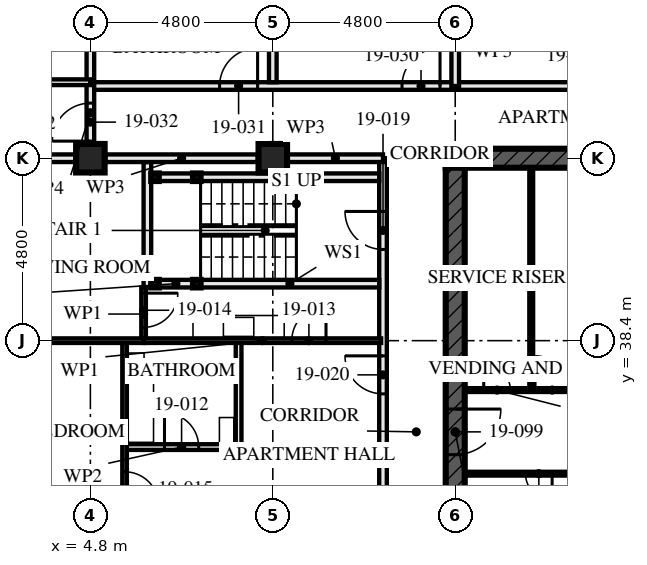
"""IFC4 building model, lengths in metres.
Left out: names, types, materials, properties, quantities, classifications, styles, units other than length and angle.
Written with IfcOpenShell. Run it as: python <this file> out.ifc"""

import sys

from ifc_helpers import new_model, si_unit, direction, frame, frame_2d, origin, origin_2d, place, context, subcontext, project, spatial, rectangle, hollow_rectangle, extrude, element, fill, save


model = new_model("IFC4")
c1 = context("Model", 3, precision=1e-05, world=origin(), true_north=direction((0.0, 1.0)))
c2 = subcontext(c1, "Body", "Model", "MODEL_VIEW")
j1 = project(units=[si_unit("LENGTHUNIT", "METRE"), si_unit("PLANEANGLEUNIT", "RADIAN")], contexts=[c1])
p1 = place(None, origin())
s1 = spatial("IfcSite", under=j1, at=p1, CompositionType="ELEMENT")
p2 = place(p1, origin())
s2 = spatial("IfcBuilding", under=s1, at=p2, CompositionType="ELEMENT")
p3 = place(p2, frame((0.0, 0.0, 72.5)))
s3 = spatial("IfcBuildingStorey", under=s2, at=p3, CompositionType="ELEMENT", Elevation=72.5)
for number, where, z_axis, x_axis in (
    (1, (4.8, 43.2, 0.0), (0.0, 0.0, 1.0), (0.0, 1.0, 0.0)),
    (2, (9.6, 43.2, 0.0), (0.0, 0.0, 1.0), (0.0, 1.0, 0.0)),
):
    element("IfcColumn", number, at=place(p3, frame(where, z_axis=z_axis, x_axis=x_axis)), inside=s3, PredefinedType="COLUMN", context=c2, shape_type="SweptSolid", body=[
        extrude(hollow_rectangle(XDim=0.75, YDim=0.75, WallThickness=0.08, at=origin_2d()), origin(), (0.0, 0.0, 1.0), 3.5),
    ])
p4 = place(p3, frame((29.05, 43.2, -0.17), z_axis=(0.0, 0.0, 1.0), x_axis=(-1.0, 0.0, 0.0)))
e3 = element("IfcWall", 3, at=p4, inside=s3, PredefinedType="SHEAR", context=c2, shape_type="SweptSolid", body=[
    extrude(rectangle(XDim=14.9, YDim=0.5, at=frame_2d((7.45, 0.0))), origin(), (0.0, 0.0, 1.0), 3.5),
])
p5 = place(p4, frame((6.85, 0.0, 0.17)))
e4 = element("IfcOpeningElement", 4, at=p5, cuts=e3, PredefinedType="OPENING", context=c2, shape_type="SweptSolid", body=[
    extrude(rectangle(XDim=1.2, YDim=2.1, at=frame_2d((0.6, 1.05))), frame((0.0, 0.26, 0.0), z_axis=(0.0, -1.0, 0.0), x_axis=(1.0, 0.0, 0.0)), (0.0, 0.0, 1.0), 0.521),
])
p6 = place(p3, frame((14.4, 42.95, -0.17), z_axis=(0.0, 0.0, 1.0), x_axis=(0.0, -1.0, 0.0)))
e5 = element("IfcWall", 5, at=p6, inside=s3, PredefinedType="SHEAR", context=c2, shape_type="SweptSolid", body=[
    extrude(rectangle(XDim=13.9, YDim=0.5, at=frame_2d((6.95, 0.0))), origin(), (0.0, 0.0, 1.0), 3.5),
])
p7 = place(p6, frame((6.35, 0.0, 0.17)))
e6 = element("IfcOpeningElement", 6, at=p7, cuts=e5, PredefinedType="OPENING", context=c2, shape_type="SweptSolid", body=[
    extrude(rectangle(XDim=1.2, YDim=2.1, at=frame_2d((0.6, 1.05))), frame((0.0, 0.26, 0.0), z_axis=(0.0, -1.0, 0.0), x_axis=(1.0, 0.0, 0.0)), (0.0, 0.0, 1.0), 0.521),
])
for number, where, z_axis, x_axis in (
    (7, (6.5, 42.7, 0.0), (0.0, 0.0, 1.0), (1.0, 0.0, 0.0)),
    (8, (6.5, 39.9, 0.0), (0.0, 0.0, 1.0), (1.0, 0.0, 0.0)),
    (9, (7.6, 42.7, 0.0), (0.0, 0.0, 1.0), (1.0, 0.0, 0.0)),
    (10, (7.6, 39.9, 0.0), (0.0, 0.0, 1.0), (1.0, 0.0, 0.0)),
):
    element("IfcColumn", number, at=place(p3, frame(where, z_axis=z_axis, x_axis=x_axis)), inside=s3, PredefinedType="COLUMN", context=c2, shape_type="SweptSolid", body=[
        extrude(hollow_rectangle(XDim=0.2, YDim=0.2, WallThickness=0.008, at=origin_2d()), origin(), (0.0, 0.0, 1.0), 3.33),
    ])
p8 = place(p3, frame((6.6, 42.7, 0.0), z_axis=(0.0, 0.0, 1.0), x_axis=(1.0, 0.0, 0.0)))
e11 = element("IfcWall", 11, at=p8, inside=s3, PredefinedType="SOLIDWALL", context=c2, shape_type="SweptSolid", body=[
    extrude(rectangle(XDim=0.9, YDim=0.2, at=frame_2d((0.45, 0.0))), origin(), (0.0, 0.0, 1.0), 2.99),
])
p9 = place(p3, frame((7.7, 42.7, 0.0), z_axis=(0.0, 0.0, 1.0), x_axis=(1.0, 0.0, 0.0)))
e12 = element("IfcWall", 12, at=p9, inside=s3, PredefinedType="SOLIDWALL", context=c2, shape_type="SweptSolid", body=[
    extrude(rectangle(XDim=4.7, YDim=0.2, at=frame_2d((2.35, 0.0))), origin(), (0.0, 0.0, 1.0), 2.99),
])
p10 = place(p3, frame((6.6, 39.9, 0.0), z_axis=(0.0, 0.0, 1.0), x_axis=(1.0, 0.0, 0.0)))
e13 = element("IfcWall", 13, at=p10, inside=s3, PredefinedType="SOLIDWALL", context=c2, shape_type="SweptSolid", body=[
    extrude(rectangle(XDim=0.9, YDim=0.2, at=frame_2d((0.45, 0.0))), origin(), (0.0, 0.0, 1.0), 2.99),
])
p11 = place(p3, frame((7.7, 39.9, 0.0), z_axis=(0.0, 0.0, 1.0), x_axis=(1.0, 0.0, 0.0)))
e14 = element("IfcWall", 14, at=p11, inside=s3, PredefinedType="SOLIDWALL", context=c2, shape_type="SweptSolid", body=[
    extrude(rectangle(XDim=4.7, YDim=0.2, at=frame_2d((2.35, 0.0))), origin(), (0.0, 0.0, 1.0), 2.99),
])
p12 = place(p3, frame((6.3, 43.1, 0.0), z_axis=(0.0, 0.0, 1.0), x_axis=(0.0, -1.0, 0.0)))
e15 = element("IfcWall", 15, at=p12, inside=s3, PredefinedType="SOLIDWALL", context=c2, shape_type="SweptSolid", body=[
    extrude(rectangle(XDim=3.3, YDim=0.2, at=frame_2d((1.65, 0.0))), origin(), (0.0, 0.0, 1.0), 3.33),
])
p13 = place(p3, frame((5.7, 35.6, 0.0), z_axis=(0.0, 0.0, 1.0), x_axis=(1.0, 0.0, 0.0)))
e16 = element("IfcWall", 16, at=p13, inside=s3, PredefinedType="PARTITIONING", context=c2, shape_type="SweptSolid", body=[
    extrude(rectangle(XDim=3.0, YDim=0.15, at=frame_2d((1.5, 0.0))), origin(), (0.0, 0.0, 1.0), 3.33),
])
p14 = place(p13, frame((1.05, 0.0, 0.0)))
e17 = element("IfcOpeningElement", 17, at=p14, cuts=e16, PredefinedType="OPENING", context=c2, shape_type="SweptSolid", body=[
    extrude(rectangle(XDim=0.9, YDim=2.1, at=frame_2d((0.45, 1.05))), frame((0.0, 0.085, 0.0), z_axis=(0.0, -1.0, 0.0), x_axis=(1.0, 0.0, 0.0)), (0.0, 0.0, 1.0), 0.171),
])
p15 = place(p3, frame((8.7, 38.4, 0.0), z_axis=(0.0, 0.0, 1.0), x_axis=(0.0, -1.0, 0.0)))
e18 = element("IfcWall", 18, at=p15, inside=s3, PredefinedType="PARTITIONING", context=c2, shape_type="SweptSolid", body=[
    extrude(rectangle(XDim=2.8, YDim=0.15, at=frame_2d((1.4, 0.0))), origin(), (0.0, 0.0, 1.0), 3.33),
])
p16 = place(p3, frame((6.2, 38.4, 0.0), z_axis=(0.0, 0.0, 1.0), x_axis=(1.0, 0.0, 0.0)))
e19 = element("IfcWall", 19, at=p16, inside=s3, PredefinedType="PARTITIONING", context=c2, shape_type="SweptSolid", body=[
    extrude(rectangle(XDim=6.25, YDim=0.12, at=frame_2d((3.125, 0.0))), origin(), (0.0, 0.0, 1.0), 2.55),
])
p17 = place(p16, frame((3.9, 0.0, 0.0)))
e20 = element("IfcOpeningElement", 20, at=p17, cuts=e19, PredefinedType="OPENING", context=c2, shape_type="SweptSolid", body=[
    extrude(rectangle(XDim=0.9, YDim=2.1, at=frame_2d((0.45, 1.05))), frame((0.0, 0.071, 0.0), z_axis=(0.0, -1.0, 0.0), x_axis=(1.0, 0.0, 0.0)), (0.0, 0.0, 1.0), 0.141),
])
p18 = place(p3, frame((6.2, 39.8, 0.0), z_axis=(0.0, 0.0, 1.0), x_axis=(0.0, -1.0, 0.0)))
e21 = element("IfcWall", 21, at=p18, inside=s3, PredefinedType="PARTITIONING", context=c2, shape_type="SweptSolid", body=[
    extrude(rectangle(XDim=1.4, YDim=0.12, at=frame_2d((0.7, 0.0))), origin(), (0.0, 0.0, 1.0), 3.33),
])
p19 = place(p18, frame((0.15, 0.0, 0.0)))
e22 = element("IfcOpeningElement", 22, at=p19, cuts=e21, PredefinedType="OPENING", context=c2, shape_type="SweptSolid", body=[
    extrude(rectangle(XDim=0.9, YDim=2.1, at=frame_2d((0.45, 1.05))), frame((0.0, 0.071, 0.0), z_axis=(0.0, -1.0, 0.0), x_axis=(1.0, 0.0, 0.0)), (0.0, 0.0, 1.0), 0.141),
])
p20 = place(p3, frame((5.7, 38.4, 0.0), z_axis=(0.0, 0.0, 1.0), x_axis=(0.0, -1.0, 0.0)))
e23 = element("IfcWall", 23, at=p20, inside=s3, PredefinedType="PARTITIONING", context=c2, shape_type="SweptSolid", body=[
    extrude(rectangle(XDim=4.8, YDim=0.12, at=frame_2d((2.4, 0.0))), origin(), (0.0, 0.0, 1.0), 3.33),
])
p21 = place(p20, frame((3.45, 0.0, 0.0)))
e24 = element("IfcOpeningElement", 24, at=p21, cuts=e23, PredefinedType="OPENING", context=c2, shape_type="SweptSolid", body=[
    extrude(rectangle(XDim=0.9, YDim=2.1, at=frame_2d((0.45, 1.05))), frame((0.0, 0.071, 0.0), z_axis=(0.0, -1.0, 0.0), x_axis=(1.0, 0.0, 0.0)), (0.0, 0.0, 1.0), 0.141),
])
p22 = place(p3, frame((0.32, 38.4, 0.0), z_axis=(0.0, 0.0, 1.0), x_axis=(1.0, 0.0, 0.0)))
e25 = element("IfcWall", 25, at=p22, inside=s3, PredefinedType="PARTITIONING", context=c2, shape_type="SweptSolid", body=[
    extrude(rectangle(XDim=5.88, YDim=0.12, at=frame_2d((2.94, 0.0))), origin(), (0.0, 0.0, 1.0), 2.55),
])
p23 = place(p3, frame((12.5, 43.2, 0.0), z_axis=(0.0, 0.0, 1.0), x_axis=(0.0, -1.0, 0.0)))
e26 = element("IfcWall", 26, at=p23, inside=s3, PredefinedType="PARTITIONING", context=c2, shape_type="SweptSolid", body=[
    extrude(rectangle(XDim=14.4, YDim=0.2, at=frame_2d((7.2, 0.0))), origin(), (0.0, 0.0, 1.0), 2.55),
])
p24 = place(p23, frame((1.4, 0.0, 0.0)))
e27 = element("IfcOpeningElement", 27, at=p24, cuts=e26, PredefinedType="OPENING", context=c2, shape_type="SweptSolid", body=[
    extrude(rectangle(XDim=1.0, YDim=2.1, at=frame_2d((0.5, 1.05))), frame((0.0, 0.111, 0.0), z_axis=(0.0, -1.0, 0.0), x_axis=(1.0, 0.0, 0.0)), (0.0, 0.0, 1.0), 0.221),
])
p25 = place(p23, frame((5.2, 0.0, 0.0)))
e28 = element("IfcOpeningElement", 28, at=p25, cuts=e26, PredefinedType="OPENING", context=c2, shape_type="SweptSolid", body=[
    extrude(rectangle(XDim=1.0, YDim=2.1, at=frame_2d((0.5, 1.05))), frame((0.0, 0.111, 0.0), z_axis=(0.0, -1.0, 0.0), x_axis=(1.0, 0.0, 0.0)), (0.0, 0.0, 1.0), 0.221),
])
p26 = place(p23, frame((10.0, 0.0, 0.0)))
e29 = element("IfcOpeningElement", 29, at=p26, cuts=e26, PredefinedType="OPENING", context=c2, shape_type="SweptSolid", body=[
    extrude(rectangle(XDim=1.0, YDim=2.1, at=frame_2d((0.5, 1.05))), frame((0.0, 0.111, 0.0), z_axis=(0.0, -1.0, 0.0), x_axis=(1.0, 0.0, 0.0)), (0.0, 0.0, 1.0), 0.221),
])
p27 = place(p3, frame((9.6, 57.28, 0.0), z_axis=(0.0, 0.0, 1.0), x_axis=(0.0, -1.0, 0.0)))
e30 = element("IfcWall", 30, at=p27, inside=s3, PredefinedType="PARTITIONING", context=c2, shape_type="SweptSolid", body=[
    extrude(rectangle(XDim=12.08, YDim=0.2, at=frame_2d((6.04, 0.0))), origin(), (0.0, 0.0, 1.0), 2.55),
])
p28 = place(p3, frame((4.8, 52.48, 0.0), z_axis=(0.0, 0.0, 1.0), x_axis=(0.0, -1.0, 0.0)))
e31 = element("IfcWall", 31, at=p28, inside=s3, PredefinedType="PARTITIONING", context=c2, shape_type="SweptSolid", body=[
    extrude(rectangle(XDim=7.28, YDim=0.2, at=frame_2d((3.64, 0.0))), origin(), (0.0, 0.0, 1.0), 2.55),
])
p29 = place(p3, frame((4.8, 45.2, 0.0), z_axis=(0.0, 0.0, 1.0), x_axis=(-1.0, 0.0, 0.0)))
e32 = element("IfcWall", 32, at=p29, inside=s3, PredefinedType="PARTITIONING", context=c2, shape_type="SweptSolid", body=[
    extrude(rectangle(XDim=2.8, YDim=0.15, at=frame_2d((1.4, 0.0))), origin(), (0.0, 0.0, 1.0), 3.33),
])
p30 = place(p3, frame((14.4, 45.1, 0.0), z_axis=(0.0, 0.0, 1.0), x_axis=(-1.0, 0.0, 0.0)))
e33 = element("IfcWall", 33, at=p30, inside=s3, PredefinedType="PARTITIONING", context=c2, shape_type="SweptSolid", body=[
    extrude(rectangle(XDim=9.6, YDim=0.2, at=frame_2d((4.8, 0.0))), origin(), (0.0, 0.0, 1.0), 3.33),
])
p31 = place(p30, frame((0.4, 0.0, 0.0)))
e34 = element("IfcOpeningElement", 34, at=p31, cuts=e33, PredefinedType="OPENING", context=c2, shape_type="SweptSolid", body=[
    extrude(rectangle(XDim=1.0, YDim=2.1, at=frame_2d((0.5, 1.05))), frame((0.0, 0.111, 0.0), z_axis=(0.0, -1.0, 0.0), x_axis=(1.0, 0.0, 0.0)), (0.0, 0.0, 1.0), 0.221),
])
p32 = place(p30, frame((5.2, 0.0, 0.0)))
e35 = element("IfcOpeningElement", 35, at=p32, cuts=e33, PredefinedType="OPENING", context=c2, shape_type="SweptSolid", body=[
    extrude(rectangle(XDim=1.0, YDim=2.1, at=frame_2d((0.5, 1.05))), frame((0.0, 0.111, 0.0), z_axis=(0.0, -1.0, 0.0), x_axis=(1.0, 0.0, 0.0)), (0.0, 0.0, 1.0), 0.221),
])
p33 = place(p3, frame((4.8, 45.2, 0.0), z_axis=(0.0, 0.0, 1.0), x_axis=(0.0, -1.0, 0.0)))
e36 = element("IfcWall", 36, at=p33, inside=s3, PredefinedType="PARTITIONING", context=c2, shape_type="SweptSolid", body=[
    extrude(rectangle(XDim=1.605, YDim=0.2, at=frame_2d((0.802, 0.0))), origin(), (0.0, 0.0, 1.0), 3.33),
])
p34 = place(p33, frame((0.55, 0.0, 0.0)))
e37 = element("IfcOpeningElement", 37, at=p34, cuts=e36, PredefinedType="OPENING", context=c2, shape_type="SweptSolid", body=[
    extrude(rectangle(XDim=1.0, YDim=2.1, at=frame_2d((0.5, 1.05))), frame((0.0, 0.111, 0.0), z_axis=(0.0, -1.0, 0.0), x_axis=(1.0, 0.0, 0.0)), (0.0, 0.0, 1.0), 0.221),
])
p35 = place(p3, frame((28.8, 45.1, 0.0), z_axis=(0.0, 0.0, 1.0), x_axis=(-1.0, 0.0, 0.0)))
e38 = element("IfcWall", 38, at=p35, inside=s3, PredefinedType="PARTITIONING", context=c2, shape_type="SweptSolid", body=[
    extrude(rectangle(XDim=14.4, YDim=0.2, at=frame_2d((7.2, 0.0))), origin(), (0.0, 0.0, 1.0), 3.33),
])
p36 = place(p35, frame((0.4, 0.0, 0.0)))
e39 = element("IfcOpeningElement", 39, at=p36, cuts=e38, PredefinedType="OPENING", context=c2, shape_type="SweptSolid", body=[
    extrude(rectangle(XDim=1.0, YDim=2.1, at=frame_2d((0.5, 1.05))), frame((0.0, 0.111, 0.0), z_axis=(0.0, -1.0, 0.0), x_axis=(1.0, 0.0, 0.0)), (0.0, 0.0, 1.0), 0.221),
])
p37 = place(p35, frame((5.2, 0.0, 0.0)))
e40 = element("IfcOpeningElement", 40, at=p37, cuts=e38, PredefinedType="OPENING", context=c2, shape_type="SweptSolid", body=[
    extrude(rectangle(XDim=1.0, YDim=2.1, at=frame_2d((0.5, 1.05))), frame((0.0, 0.111, 0.0), z_axis=(0.0, -1.0, 0.0), x_axis=(1.0, 0.0, 0.0)), (0.0, 0.0, 1.0), 0.221),
])
p38 = place(p35, frame((10.0, 0.0, 0.0)))
e41 = element("IfcOpeningElement", 41, at=p38, cuts=e38, PredefinedType="OPENING", context=c2, shape_type="SweptSolid", body=[
    extrude(rectangle(XDim=1.0, YDim=2.1, at=frame_2d((0.5, 1.05))), frame((0.0, 0.111, 0.0), z_axis=(0.0, -1.0, 0.0), x_axis=(1.0, 0.0, 0.0)), (0.0, 0.0, 1.0), 0.221),
])
p39 = place(p3, frame((16.4, 37.15, 0.0), z_axis=(0.0, 0.0, 1.0), x_axis=(0.0, 1.0, 0.0)))
e42 = element("IfcWall", 42, at=p39, inside=s3, PredefinedType="SOLIDWALL", context=c2, shape_type="SweptSolid", body=[
    extrude(rectangle(XDim=5.8, YDim=0.1, at=frame_2d((2.9, 0.0))), origin(), (0.0, 0.0, 1.0), 3.33),
])
p40 = place(p3, frame((14.65, 34.9, 0.0), z_axis=(0.0, 0.0, 1.0), x_axis=(1.0, 0.0, 0.0)))
e43 = element("IfcWall", 43, at=p40, inside=s3, PredefinedType="SOLIDWALL", context=c2, shape_type="SweptSolid", body=[
    extrude(rectangle(XDim=5.9, YDim=0.1, at=frame_2d((2.95, 0.0))), origin(), (0.0, 0.0, 1.0), 3.33),
])
p41 = place(p40, frame((1.6, 0.0, 0.0)))
e44 = element("IfcOpeningElement", 44, at=p41, cuts=e43, PredefinedType="OPENING", context=c2, shape_type="SweptSolid", body=[
    extrude(rectangle(XDim=0.7, YDim=2.1, at=frame_2d((0.35, 1.05))), frame((0.0, 0.061, 0.0), z_axis=(0.0, -1.0, 0.0), x_axis=(1.0, 0.0, 0.0)), (0.0, 0.0, 1.0), 0.121),
])
p42 = place(p3, frame((14.65, 37.1, 0.0), z_axis=(0.0, 0.0, 1.0), x_axis=(1.0, 0.0, 0.0)))
e45 = element("IfcWall", 45, at=p42, inside=s3, PredefinedType="SOLIDWALL", context=c2, shape_type="SweptSolid", body=[
    extrude(rectangle(XDim=5.9, YDim=0.1, at=frame_2d((2.95, 0.0))), origin(), (0.0, 0.0, 1.0), 3.33),
])
p43 = place(p42, frame((0.5, 0.0, 0.0)))
e46 = element("IfcOpeningElement", 46, at=p43, cuts=e45, PredefinedType="OPENING", context=c2, shape_type="SweptSolid", body=[
    extrude(rectangle(XDim=0.7, YDim=2.1, at=frame_2d((0.35, 1.05))), frame((0.0, 0.061, 0.0), z_axis=(0.0, -1.0, 0.0), x_axis=(1.0, 0.0, 0.0)), (0.0, 0.0, 1.0), 0.121),
])
p44 = place(p42, frame((1.85, 0.0, 0.0)))
e47 = element("IfcOpeningElement", 47, at=p44, cuts=e45, PredefinedType="OPENING", context=c2, shape_type="SweptSolid", body=[
    extrude(rectangle(XDim=0.9, YDim=2.1, at=frame_2d((0.45, 1.05))), frame((0.0, 0.061, 0.0), z_axis=(0.0, -1.0, 0.0), x_axis=(1.0, 0.0, 0.0)), (0.0, 0.0, 1.0), 0.121),
])
p45 = place(p3, frame((12.5, 43.2, 0.0), z_axis=(0.0, 0.0, 1.0), x_axis=(-1.0, 0.0, 0.0)))
e48 = element("IfcWall", 48, at=p45, inside=s3, PredefinedType="PARTITIONING", context=c2, shape_type="SweptSolid", body=[
    extrude(rectangle(XDim=2.505, YDim=0.2, at=frame_2d((1.252, 0.0))), origin(), (0.0, 0.0, 1.0), 2.32),
])
p46 = place(p3, frame((9.205, 43.2, 0.0), z_axis=(0.0, 0.0, 1.0), x_axis=(-1.0, 0.0, 0.0)))
e49 = element("IfcWall", 49, at=p46, inside=s3, PredefinedType="PARTITIONING", context=c2, shape_type="SweptSolid", body=[
    extrude(rectangle(XDim=4.01, YDim=0.2, at=frame_2d((2.005, 0.0))), origin(), (0.0, 0.0, 1.0), 2.32),
])
p47 = place(p3, frame((4.405, 43.2, 0.0), z_axis=(0.0, 0.0, 1.0), x_axis=(-1.0, 0.0, 0.0)))
e50 = element("IfcWall", 50, at=p47, inside=s3, PredefinedType="PARTITIONING", context=c2, shape_type="SweptSolid", body=[
    extrude(rectangle(XDim=4.085, YDim=0.2, at=frame_2d((2.042, 0.0))), origin(), (0.0, 0.0, 1.0), 2.32),
])
p48 = place(p3, frame((14.4, 45.1, 0.0), z_axis=(0.0, 0.0, 1.0), x_axis=(0.0, 1.0, 0.0)))
e51 = element("IfcWall", 51, at=p48, inside=s3, PredefinedType="PARTITIONING", context=c2, shape_type="SweptSolid", body=[
    extrude(rectangle(XDim=2.555, YDim=0.2, at=frame_2d((1.277, 0.0))), origin(), (0.0, 0.0, 1.0), 2.32),
])
p49 = place(p14, origin())
e52 = element("IfcDoor", 52, at=p49, inside=s3, OperationType="SINGLE_SWING_RIGHT", PredefinedType="DOOR", context=c2, shape_type="SweptSolid", body=[
    extrude(rectangle(XDim=0.9, YDim=2.1, at=frame_2d((0.45, 1.05))), frame((0.0, 0.022, 0.0), z_axis=(0.0, -1.0, 0.0), x_axis=(1.0, 0.0, 0.0)), (0.0, 0.0, 1.0), 0.044),
])
fill(e17, e52)
p50 = place(p17, origin())
e53 = element("IfcDoor", 53, at=p50, inside=s3, OperationType="SINGLE_SWING_LEFT", PredefinedType="DOOR", context=c2, shape_type="SweptSolid", body=[
    extrude(rectangle(XDim=0.9, YDim=2.1, at=frame_2d((0.45, 1.05))), frame((0.0, 0.022, 0.0), z_axis=(0.0, -1.0, 0.0), x_axis=(1.0, 0.0, 0.0)), (0.0, 0.0, 1.0), 0.044),
])
fill(e20, e53)
p51 = place(p19, origin())
e54 = element("IfcDoor", 54, at=p51, inside=s3, OperationType="SINGLE_SWING_RIGHT", PredefinedType="DOOR", context=c2, shape_type="SweptSolid", body=[
    extrude(rectangle(XDim=0.9, YDim=2.1, at=frame_2d((0.45, 1.05))), frame((0.0, 0.022, 0.0), z_axis=(0.0, -1.0, 0.0), x_axis=(1.0, 0.0, 0.0)), (0.0, 0.0, 1.0), 0.044),
])
fill(e22, e54)
p52 = place(p21, origin())
e55 = element("IfcDoor", 55, at=p52, inside=s3, OperationType="SINGLE_SWING_LEFT", PredefinedType="DOOR", context=c2, shape_type="SweptSolid", body=[
    extrude(rectangle(XDim=0.9, YDim=2.1, at=frame_2d((0.45, 1.05))), frame((0.0, 0.022, 0.0), z_axis=(0.0, -1.0, 0.0), x_axis=(1.0, 0.0, 0.0)), (0.0, 0.0, 1.0), 0.044),
])
fill(e24, e55)
p53 = place(p24, frame((1.0, 0.0, 0.0), z_axis=(0.0, 0.0, 1.0), x_axis=(-1.0, 0.0, 0.0)))
e56 = element("IfcDoor", 56, at=p53, inside=s3, OperationType="SINGLE_SWING_LEFT", PredefinedType="DOOR", context=c2, shape_type="SweptSolid", body=[
    extrude(rectangle(XDim=1.0, YDim=2.1, at=frame_2d((0.5, 1.05))), frame((0.0, 0.032, 0.0), z_axis=(0.0, -1.0, 0.0), x_axis=(1.0, 0.0, 0.0)), (0.0, 0.0, 1.0), 0.064),
])
fill(e27, e56)
p54 = place(p25, frame((1.0, 0.0, 0.0), z_axis=(0.0, 0.0, 1.0), x_axis=(-1.0, 0.0, 0.0)))
e57 = element("IfcDoor", 57, at=p54, inside=s3, OperationType="SINGLE_SWING_LEFT", PredefinedType="DOOR", context=c2, shape_type="SweptSolid", body=[
    extrude(rectangle(XDim=1.0, YDim=2.1, at=frame_2d((0.5, 1.05))), frame((0.0, 0.027, 0.0), z_axis=(0.0, -1.0, 0.0), x_axis=(1.0, 0.0, 0.0)), (0.0, 0.0, 1.0), 0.054),
])
fill(e28, e57)
p55 = place(p31, frame((1.0, 0.0, 0.0), z_axis=(0.0, 0.0, 1.0), x_axis=(-1.0, 0.0, 0.0)))
e58 = element("IfcDoor", 58, at=p55, inside=s3, OperationType="SINGLE_SWING_LEFT", PredefinedType="DOOR", context=c2, shape_type="SweptSolid", body=[
    extrude(rectangle(XDim=1.0, YDim=2.1, at=frame_2d((0.5, 1.05))), frame((0.0, 0.027, 0.0), z_axis=(0.0, -1.0, 0.0), x_axis=(1.0, 0.0, 0.0)), (0.0, 0.0, 1.0), 0.054),
])
fill(e34, e58)
p56 = place(p32, frame((1.0, 0.0, 0.0), z_axis=(0.0, 0.0, 1.0), x_axis=(-1.0, 0.0, 0.0)))
e59 = element("IfcDoor", 59, at=p56, inside=s3, OperationType="SINGLE_SWING_LEFT", PredefinedType="DOOR", context=c2, shape_type="SweptSolid", body=[
    extrude(rectangle(XDim=1.0, YDim=2.1, at=frame_2d((0.5, 1.05))), frame((0.0, 0.027, 0.0), z_axis=(0.0, -1.0, 0.0), x_axis=(1.0, 0.0, 0.0)), (0.0, 0.0, 1.0), 0.054),
])
fill(e35, e59)
p57 = place(p34, frame((1.0, 0.0, 0.0), z_axis=(0.0, 0.0, 1.0), x_axis=(-1.0, 0.0, 0.0)))
e60 = element("IfcDoor", 60, at=p57, inside=s3, OperationType="SINGLE_SWING_RIGHT", PredefinedType="DOOR", context=c2, shape_type="SweptSolid", body=[
    extrude(rectangle(XDim=1.0, YDim=2.1, at=frame_2d((0.5, 1.05))), frame((0.0, 0.027, 0.0), z_axis=(0.0, -1.0, 0.0), x_axis=(1.0, 0.0, 0.0)), (0.0, 0.0, 1.0), 0.054),
])
fill(e37, e60)
p58 = place(p41, frame((0.7, 0.0, 0.0), z_axis=(0.0, 0.0, 1.0), x_axis=(-1.0, 0.0, 0.0)))
e61 = element("IfcDoor", 61, at=p58, inside=s3, OperationType="SINGLE_SWING_RIGHT", PredefinedType="DOOR", context=c2, shape_type="SweptSolid", body=[
    extrude(rectangle(XDim=0.7, YDim=2.1, at=frame_2d((0.35, 1.05))), frame((0.0, 0.027, 0.0), z_axis=(0.0, -1.0, 0.0), x_axis=(1.0, 0.0, 0.0)), (0.0, 0.0, 1.0), 0.054),
])
fill(e44, e61)
p59 = place(p43, origin())
e62 = element("IfcDoor", 62, at=p59, inside=s3, OperationType="SINGLE_SWING_RIGHT", PredefinedType="DOOR", context=c2, shape_type="SweptSolid", body=[
    extrude(rectangle(XDim=0.7, YDim=2.1, at=frame_2d((0.35, 1.05))), frame((0.0, 0.027, 0.0), z_axis=(0.0, -1.0, 0.0), x_axis=(1.0, 0.0, 0.0)), (0.0, 0.0, 1.0), 0.054),
])
fill(e46, e62)
p60 = place(p44, origin())
e63 = element("IfcDoor", 63, at=p60, inside=s3, OperationType="SINGLE_SWING_RIGHT", PredefinedType="DOOR", context=c2, shape_type="SweptSolid", body=[
    extrude(rectangle(XDim=0.9, YDim=2.1, at=frame_2d((0.45, 1.05))), frame((0.0, 0.027, 0.0), z_axis=(0.0, -1.0, 0.0), x_axis=(1.0, 0.0, 0.0)), (0.0, 0.0, 1.0), 0.054),
])
fill(e47, e63)
p61 = place(p7, origin())
e64 = element("IfcDoor", 64, at=p61, inside=s3, OperationType="SINGLE_SWING_LEFT", PredefinedType="DOOR", context=c2, shape_type="SweptSolid", body=[
    extrude(rectangle(XDim=1.2, YDim=2.1, at=frame_2d((0.6, 1.05))), frame((0.0, 0.027, 0.0), z_axis=(0.0, -1.0, 0.0), x_axis=(1.0, 0.0, 0.0)), (0.0, 0.0, 1.0), 0.054),
])
fill(e6, e64)
save(model, sys.argv[1])
